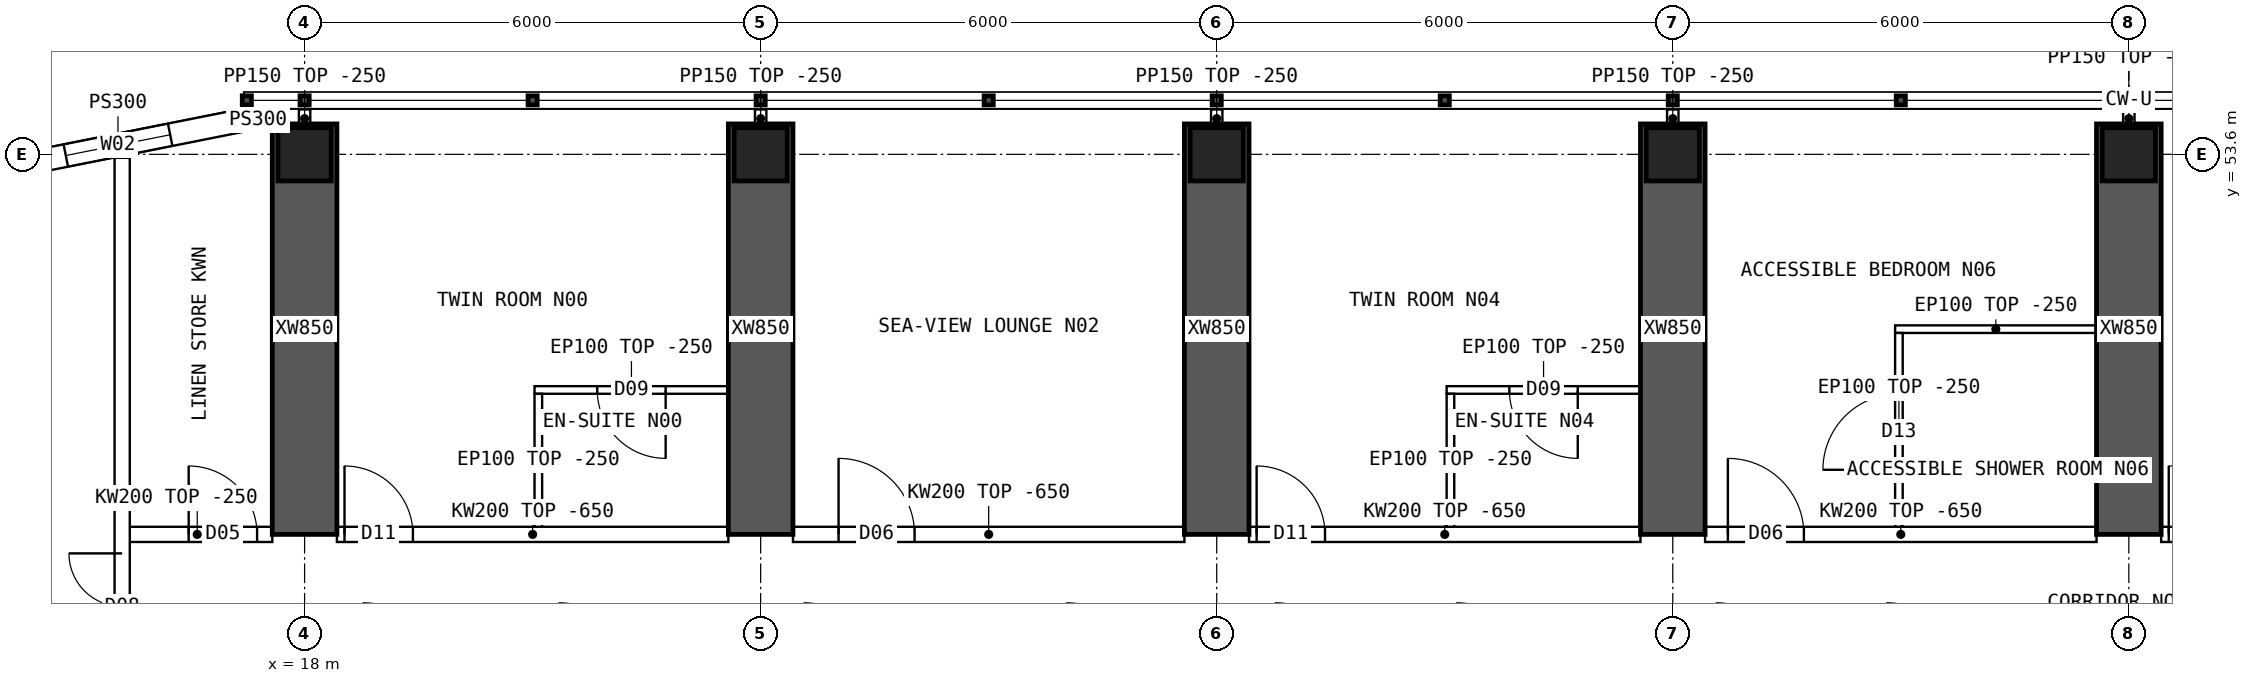
"""IFC4 building model, lengths in metres.
Left out: names, types, materials, properties, quantities, classifications, styles, units other than length and angle.
Written with IfcOpenShell. Run it as: python <this file> out.ifc"""

import sys

from ifc_helpers import new_model, si_unit, direction, frame, frame_2d, origin, origin_2d, place, context, subcontext, project, spatial, polyline, rectangle, hollow_rectangle, outline, extrude, element, fill, save


model = new_model("IFC4")
c1 = context("Model", 3, precision=1e-05, world=origin(), true_north=direction((0.0, 1.0)))
c2 = subcontext(c1, "Body", "Model", "MODEL_VIEW")
j1 = project(units=[si_unit("LENGTHUNIT", "METRE"), si_unit("PLANEANGLEUNIT", "RADIAN")], contexts=[c1])
p1 = place(None, origin())
s1 = spatial("IfcSite", under=j1, at=p1, CompositionType="ELEMENT")
p2 = place(p1, origin())
s2 = spatial("IfcBuilding", under=s1, at=p2, CompositionType="ELEMENT")
p3 = place(p2, frame((0.0, 0.0, 193.6)))
s3 = spatial("IfcBuildingStorey", under=s2, at=p3, CompositionType="ELEMENT", Elevation=193.6)
for number, where, z_axis, x_axis in (
    (1, (18.0, 53.6, 0.0), (0.0, 0.0, 1.0), (1.0, 0.0, 0.0)),
    (2, (24.0, 53.6, 0.0), (0.0, 0.0, 1.0), (1.0, 0.0, 0.0)),
    (3, (30.0, 53.6, 0.0), (0.0, 0.0, 1.0), (1.0, 0.0, 0.0)),
    (4, (36.0, 53.6, 0.0), (0.0, 0.0, 1.0), (1.0, 0.0, 0.0)),
    (5, (42.0, 53.6, 0.0), (0.0, 0.0, 1.0), (1.0, 0.0, 0.0)),
):
    element("IfcColumn", number, at=place(p3, frame(where, z_axis=z_axis, x_axis=x_axis)), inside=s3, PredefinedType="COLUMN", context=c2, shape_type="SweptSolid", body=[
        extrude(hollow_rectangle(XDim=0.7, YDim=0.7, WallThickness=0.07, at=origin_2d()), origin(), (0.0, 0.0, 1.0), 3.75),
    ])
for number, where, z_axis, x_axis in (
    (6, (18.0, 48.6, 0.0), (0.0, 0.0, 1.0), (0.0, 1.0, 0.0)),
    (7, (24.0, 48.6, 0.0), (0.0, 0.0, 1.0), (0.0, 1.0, 0.0)),
    (8, (30.0, 48.6, 0.0), (0.0, 0.0, 1.0), (0.0, 1.0, 0.0)),
    (9, (36.0, 48.6, 0.0), (0.0, 0.0, 1.0), (0.0, 1.0, 0.0)),
    (10, (42.0, 48.6, 0.0), (0.0, 0.0, 1.0), (0.0, 1.0, 0.0)),
):
    element("IfcWall", number, at=place(p3, frame(where, z_axis=z_axis, x_axis=x_axis)), inside=s3, PredefinedType="SHEAR", context=c2, shape_type="SweptSolid", body=[
        extrude(rectangle(XDim=5.4, YDim=0.85, at=frame_2d((2.7, 0.0))), origin(), (0.0, 0.0, 1.0), 3.75),
    ])
p4 = place(p3, frame((17.2, 54.05, 0.0), z_axis=(0.0, 0.0, 1.0), x_axis=(-0.98078325777, -0.195100490205, 0.0)))
e11 = element("IfcWall", 11, at=p4, inside=s3, PredefinedType="SOLIDWALL", context=c2, shape_type="SweptSolid", body=[
    extrude(outline(polyline([(-0.03, -0.15), (3.405, -0.15), (3.345, 0.15), (0.03, 0.15), (-0.03, -0.15)])), origin(), (0.0, 0.0, 1.0), 3.5),
])
p5 = place(p4, frame((0.988, 0.0, 0.9)))
e12 = element("IfcOpeningElement", 12, at=p5, cuts=e11, PredefinedType="OPENING", context=c2, shape_type="SweptSolid", body=[
    extrude(rectangle(XDim=1.4, YDim=1.8, at=frame_2d((0.7, 0.9))), frame((0.0, 0.16, 0.0), z_axis=(0.0, -1.0, 0.0), x_axis=(1.0, 0.0, 0.0)), (0.0, 0.0, 1.0), 0.32),
])
p6 = place(p3, frame((17.2, 54.05, 0.0), z_axis=(0.0, 0.0, 1.0), x_axis=(1.0, 0.0, 0.0)))
e13 = element("IfcWall", 13, at=p6, inside=s3, PredefinedType="SOLIDWALL", context=c2, shape_type="SweptSolid", body=[
    extrude(rectangle(XDim=0.375, YDim=0.3, at=frame_2d((0.188, 0.0))), origin(), (0.0, 0.0, 1.0), 3.5),
])
p7 = place(p3, frame((15.6, 48.6, 0.0), z_axis=(0.0, 0.0, 1.0), x_axis=(1.0, 0.0, 0.0)))
e14 = element("IfcWall", 14, at=p7, inside=s3, PredefinedType="SOLIDWALL", context=c2, shape_type="SweptSolid", body=[
    extrude(rectangle(XDim=1.975, YDim=0.2, at=frame_2d((0.987, 0.0))), origin(), (0.0, 0.0, 1.0), 3.5),
])
p8 = place(p7, frame((0.875, 0.0, 0.0)))
e15 = element("IfcOpeningElement", 15, at=p8, cuts=e14, PredefinedType="OPENING", context=c2, shape_type="SweptSolid", body=[
    extrude(rectangle(XDim=0.9, YDim=2.1, at=frame_2d((0.45, 1.05))), frame((0.0, 0.11, 0.0), z_axis=(0.0, -1.0, 0.0), x_axis=(1.0, 0.0, 0.0)), (0.0, 0.0, 1.0), 0.22),
])
p9 = place(p3, frame((18.425, 48.6, 0.0), z_axis=(0.0, 0.0, 1.0), x_axis=(1.0, 0.0, 0.0)))
e16 = element("IfcWall", 16, at=p9, inside=s3, PredefinedType="SOLIDWALL", context=c2, shape_type="SweptSolid", body=[
    extrude(outline(polyline([(0.0, 0.0), (5.15, 0.0), (5.15, 3.1), (0.0, 3.1), (0.0, 0.0)])), frame((0.0, 0.1, 0.0), z_axis=(0.0, -1.0, 0.0), x_axis=(1.0, 0.0, 0.0)), (0.0, 0.0, 1.0), 0.2),
])
p10 = place(p9, frame((0.1, 0.0, 0.0)))
e17 = element("IfcOpeningElement", 17, at=p10, cuts=e16, PredefinedType="OPENING", context=c2, shape_type="SweptSolid", body=[
    extrude(rectangle(XDim=0.9, YDim=2.1, at=frame_2d((0.45, 1.05))), frame((0.0, 0.11, 0.0), z_axis=(0.0, -1.0, 0.0), x_axis=(1.0, 0.0, 0.0)), (0.0, 0.0, 1.0), 0.22),
])
p11 = place(p3, frame((24.425, 48.6, 0.0), z_axis=(0.0, 0.0, 1.0), x_axis=(1.0, 0.0, 0.0)))
e18 = element("IfcWall", 18, at=p11, inside=s3, PredefinedType="SOLIDWALL", context=c2, shape_type="SweptSolid", body=[
    extrude(outline(polyline([(0.0, 0.0), (5.15, 0.0), (5.15, 3.1), (0.0, 3.1), (0.0, 0.0)])), frame((0.0, 0.1, 0.0), z_axis=(0.0, -1.0, 0.0), x_axis=(1.0, 0.0, 0.0)), (0.0, 0.0, 1.0), 0.2),
])
p12 = place(p11, frame((0.6, 0.0, 0.0)))
e19 = element("IfcOpeningElement", 19, at=p12, cuts=e18, PredefinedType="OPENING", context=c2, shape_type="SweptSolid", body=[
    extrude(rectangle(XDim=1.0, YDim=2.1, at=frame_2d((0.5, 1.05))), frame((0.0, 0.11, 0.0), z_axis=(0.0, -1.0, 0.0), x_axis=(1.0, 0.0, 0.0)), (0.0, 0.0, 1.0), 0.22),
])
p13 = place(p3, frame((30.425, 48.6, 0.0), z_axis=(0.0, 0.0, 1.0), x_axis=(1.0, 0.0, 0.0)))
e20 = element("IfcWall", 20, at=p13, inside=s3, PredefinedType="SOLIDWALL", context=c2, shape_type="SweptSolid", body=[
    extrude(outline(polyline([(0.0, 0.0), (5.15, 0.0), (5.15, 3.1), (0.0, 3.1), (0.0, 0.0)])), frame((0.0, 0.1, 0.0), z_axis=(0.0, -1.0, 0.0), x_axis=(1.0, 0.0, 0.0)), (0.0, 0.0, 1.0), 0.2),
])
p14 = place(p13, frame((0.1, 0.0, 0.0)))
e21 = element("IfcOpeningElement", 21, at=p14, cuts=e20, PredefinedType="OPENING", context=c2, shape_type="SweptSolid", body=[
    extrude(rectangle(XDim=0.9, YDim=2.1, at=frame_2d((0.45, 1.05))), frame((0.0, 0.11, 0.0), z_axis=(0.0, -1.0, 0.0), x_axis=(1.0, 0.0, 0.0)), (0.0, 0.0, 1.0), 0.22),
])
p15 = place(p3, frame((36.425, 48.6, 0.0), z_axis=(0.0, 0.0, 1.0), x_axis=(1.0, 0.0, 0.0)))
e22 = element("IfcWall", 22, at=p15, inside=s3, PredefinedType="SOLIDWALL", context=c2, shape_type="SweptSolid", body=[
    extrude(outline(polyline([(0.0, 0.0), (5.15, 0.0), (5.15, 3.1), (0.0, 3.1), (0.0, 0.0)])), frame((0.0, 0.1, 0.0), z_axis=(0.0, -1.0, 0.0), x_axis=(1.0, 0.0, 0.0)), (0.0, 0.0, 1.0), 0.2),
])
p16 = place(p15, frame((0.3, 0.0, 0.0)))
e23 = element("IfcOpeningElement", 23, at=p16, cuts=e22, PredefinedType="OPENING", context=c2, shape_type="SweptSolid", body=[
    extrude(rectangle(XDim=1.0, YDim=2.1, at=frame_2d((0.5, 1.05))), frame((0.0, 0.11, 0.0), z_axis=(0.0, -1.0, 0.0), x_axis=(1.0, 0.0, 0.0)), (0.0, 0.0, 1.0), 0.22),
])
p17 = place(p3, frame((42.425, 48.6, 0.0), z_axis=(0.0, 0.0, 1.0), x_axis=(1.0, 0.0, 0.0)))
e24 = element("IfcWall", 24, at=p17, inside=s3, PredefinedType="SOLIDWALL", context=c2, shape_type="SweptSolid", body=[
    extrude(outline(polyline([(0.0, 0.0), (5.15, 0.0), (5.15, 3.1), (0.0, 3.1), (0.0, 0.0)])), frame((0.0, 0.1, 0.0), z_axis=(0.0, -1.0, 0.0), x_axis=(1.0, 0.0, 0.0)), (0.0, 0.0, 1.0), 0.2),
])
p18 = place(p17, frame((0.1, 0.0, 0.0)))
e25 = element("IfcOpeningElement", 25, at=p18, cuts=e24, PredefinedType="OPENING", context=c2, shape_type="SweptSolid", body=[
    extrude(rectangle(XDim=0.9, YDim=2.1, at=frame_2d((0.45, 1.05))), frame((0.0, 0.11, 0.0), z_axis=(0.0, -1.0, 0.0), x_axis=(1.0, 0.0, 0.0)), (0.0, 0.0, 1.0), 0.22),
])
p19 = place(p3, frame((21.025, 50.5, 0.0), z_axis=(0.0, 0.0, 1.0), x_axis=(1.0, 0.0, 0.0)))
e26 = element("IfcWall", 26, at=p19, inside=s3, PredefinedType="PARTITIONING", context=c2, shape_type="SweptSolid", body=[
    extrude(rectangle(XDim=2.55, YDim=0.1, at=frame_2d((1.275, 0.0))), origin(), (0.0, 0.0, 1.0), 3.5),
])
p20 = place(p19, frame((0.825, 0.0, 0.0)))
e27 = element("IfcOpeningElement", 27, at=p20, cuts=e26, PredefinedType="OPENING", context=c2, shape_type="SweptSolid", body=[
    extrude(rectangle(XDim=0.9, YDim=2.1, at=frame_2d((0.45, 1.05))), frame((0.0, 0.06, 0.0), z_axis=(0.0, -1.0, 0.0), x_axis=(1.0, 0.0, 0.0)), (0.0, 0.0, 1.0), 0.12),
])
p21 = place(p3, frame((21.075, 50.45, 0.0), z_axis=(0.0, 0.0, 1.0), x_axis=(0.0, -1.0, 0.0)))
e28 = element("IfcWall", 28, at=p21, inside=s3, PredefinedType="PARTITIONING", context=c2, shape_type="SweptSolid", body=[
    extrude(outline(polyline([(0.0, 0.0), (1.75, 0.0), (1.75, 3.1), (1.702, 3.1), (1.7, 3.5), (0.0, 3.5), (0.0, 0.0)])), frame((0.0, 0.05, 0.0), z_axis=(0.0, -1.0, 0.0), x_axis=(1.0, 0.0, 0.0)), (0.0, 0.0, 1.0), 0.1),
])
p22 = place(p3, frame((33.025, 50.5, 0.0), z_axis=(0.0, 0.0, 1.0), x_axis=(1.0, 0.0, 0.0)))
e29 = element("IfcWall", 29, at=p22, inside=s3, PredefinedType="PARTITIONING", context=c2, shape_type="SweptSolid", body=[
    extrude(rectangle(XDim=2.55, YDim=0.1, at=frame_2d((1.275, 0.0))), origin(), (0.0, 0.0, 1.0), 3.5),
])
p23 = place(p22, frame((0.825, 0.0, 0.0)))
e30 = element("IfcOpeningElement", 30, at=p23, cuts=e29, PredefinedType="OPENING", context=c2, shape_type="SweptSolid", body=[
    extrude(rectangle(XDim=0.9, YDim=2.1, at=frame_2d((0.45, 1.05))), frame((0.0, 0.06, 0.0), z_axis=(0.0, -1.0, 0.0), x_axis=(1.0, 0.0, 0.0)), (0.0, 0.0, 1.0), 0.12),
])
p24 = place(p3, frame((33.075, 50.45, 0.0), z_axis=(0.0, 0.0, 1.0), x_axis=(0.0, -1.0, 0.0)))
e31 = element("IfcWall", 31, at=p24, inside=s3, PredefinedType="PARTITIONING", context=c2, shape_type="SweptSolid", body=[
    extrude(outline(polyline([(0.0, 0.0), (1.75, 0.0), (1.75, 3.1), (1.702, 3.1), (1.7, 3.5), (0.0, 3.5), (0.0, 0.0)])), frame((0.0, 0.05, 0.0), z_axis=(0.0, -1.0, 0.0), x_axis=(1.0, 0.0, 0.0)), (0.0, 0.0, 1.0), 0.1),
])
p25 = place(p3, frame((38.925, 51.3, 0.0), z_axis=(0.0, 0.0, 1.0), x_axis=(1.0, 0.0, 0.0)))
e32 = element("IfcWall", 32, at=p25, inside=s3, PredefinedType="PARTITIONING", context=c2, shape_type="SweptSolid", body=[
    extrude(rectangle(XDim=2.65, YDim=0.1, at=frame_2d((1.325, 0.0))), origin(), (0.0, 0.0, 1.0), 3.5),
])
p26 = place(p3, frame((38.975, 51.25, 0.0), z_axis=(0.0, 0.0, 1.0), x_axis=(0.0, -1.0, 0.0)))
e33 = element("IfcWall", 33, at=p26, inside=s3, PredefinedType="PARTITIONING", context=c2, shape_type="SweptSolid", body=[
    extrude(outline(polyline([(0.0, 0.0), (2.55, 0.0), (2.55, 3.1), (2.502, 3.1), (2.5, 3.5), (0.0, 3.5), (0.0, 0.0)])), frame((0.0, 0.05, 0.0), z_axis=(0.0, -1.0, 0.0), x_axis=(1.0, 0.0, 0.0)), (0.0, 0.0, 1.0), 0.1),
])
p27 = place(p26, frame((0.8, 0.0, 0.0)))
e34 = element("IfcOpeningElement", 34, at=p27, cuts=e33, PredefinedType="OPENING", context=c2, shape_type="SweptSolid", body=[
    extrude(rectangle(XDim=1.0, YDim=2.1, at=frame_2d((0.5, 1.05))), frame((0.0, 0.06, 0.0), z_axis=(0.0, -1.0, 0.0), x_axis=(1.0, 0.0, 0.0)), (0.0, 0.0, 1.0), 0.12),
])
p28 = place(p3, frame((15.6, 10.446, 0.0), z_axis=(0.0, 0.0, 1.0), x_axis=(0.0, 1.0, 0.0)))
e35 = element("IfcWall", 35, at=p28, inside=s3, PredefinedType="SOLIDWALL", context=c2, shape_type="SweptSolid", body=[
    extrude(rectangle(XDim=43.107, YDim=0.2, at=frame_2d((21.554, 0.0))), origin(), (0.0, 0.0, 1.0), 3.5),
])
p29 = place(p28, frame((5.104, 0.0, 0.0)))
e36 = element("IfcOpeningElement", 36, at=p29, cuts=e35, PredefinedType="OPENING", context=c2, shape_type="SweptSolid", body=[
    extrude(rectangle(XDim=1.4, YDim=2.1, at=frame_2d((0.7, 1.05))), frame((0.0, 0.11, 0.0), z_axis=(0.0, -1.0, 0.0), x_axis=(1.0, 0.0, 0.0)), (0.0, 0.0, 1.0), 0.22),
])
p30 = place(p28, frame((36.504, 0.0, 0.0)))
e37 = element("IfcOpeningElement", 37, at=p30, cuts=e35, PredefinedType="OPENING", context=c2, shape_type="SweptSolid", body=[
    extrude(rectangle(XDim=1.4, YDim=2.1, at=frame_2d((0.7, 1.05))), frame((0.0, 0.11, 0.0), z_axis=(0.0, -1.0, 0.0), x_axis=(1.0, 0.0, 0.0)), (0.0, 0.0, 1.0), 0.22),
])
for number, where, z_axis, x_axis in (
    (38, (18.0, 53.95, 0.0), (0.0, 0.0, 1.0), (0.0, 1.0, 0.0)),
    (39, (24.0, 53.95, 0.0), (0.0, 0.0, 1.0), (0.0, 1.0, 0.0)),
    (40, (30.0, 53.95, 0.0), (0.0, 0.0, 1.0), (0.0, 1.0, 0.0)),
    (41, (36.0, 53.95, 0.0), (0.0, 0.0, 1.0), (0.0, 1.0, 0.0)),
    (42, (42.0, 53.95, 0.0), (0.0, 0.0, 1.0), (0.0, 1.0, 0.0)),
):
    element("IfcWall", number, at=place(p3, frame(where, z_axis=z_axis, x_axis=x_axis)), inside=s3, PredefinedType="PARTITIONING", context=c2, shape_type="SweptSolid", body=[
        extrude(rectangle(XDim=0.24, YDim=0.15, at=frame_2d((0.12, 0.0))), origin(), (0.0, 0.0, 1.0), 3.5),
    ])
p31 = place(p5, origin())
e43 = element("IfcWindow", 43, at=p31, inside=s3, PartitioningType="SINGLE_PANEL", PredefinedType="WINDOW", context=c2, shape_type="SweptSolid", body=[
    extrude(rectangle(XDim=1.4, YDim=1.8, at=frame_2d((0.7, 0.9))), frame((0.0, 0.03, 0.0), z_axis=(0.0, -1.0, 0.0), x_axis=(1.0, 0.0, 0.0)), (0.0, 0.0, 1.0), 0.06),
])
fill(e12, e43)
p32 = place(p20, origin())
e44 = element("IfcDoor", 44, at=p32, inside=s3, OperationType="SINGLE_SWING_RIGHT", PredefinedType="DOOR", context=c2, shape_type="SweptSolid", body=[
    extrude(rectangle(XDim=0.9, YDim=2.1, at=frame_2d((0.45, 1.05))), frame((0.0, 0.025, 0.0), z_axis=(0.0, -1.0, 0.0), x_axis=(1.0, 0.0, 0.0)), (0.0, 0.0, 1.0), 0.05),
])
fill(e27, e44)
p33 = place(p10, origin())
e45 = element("IfcDoor", 45, at=p33, inside=s3, OperationType="SINGLE_SWING_LEFT", PredefinedType="DOOR", context=c2, shape_type="SweptSolid", body=[
    extrude(rectangle(XDim=0.9, YDim=2.1, at=frame_2d((0.45, 1.05))), frame((0.0, 0.025, 0.0), z_axis=(0.0, -1.0, 0.0), x_axis=(1.0, 0.0, 0.0)), (0.0, 0.0, 1.0), 0.05),
])
fill(e17, e45)
p34 = place(p12, origin())
e46 = element("IfcDoor", 46, at=p34, inside=s3, OperationType="SINGLE_SWING_LEFT", PredefinedType="DOOR", context=c2, shape_type="SweptSolid", body=[
    extrude(rectangle(XDim=1.0, YDim=2.1, at=frame_2d((0.5, 1.05))), frame((0.0, 0.025, 0.0), z_axis=(0.0, -1.0, 0.0), x_axis=(1.0, 0.0, 0.0)), (0.0, 0.0, 1.0), 0.05),
])
fill(e19, e46)
p35 = place(p23, origin())
e47 = element("IfcDoor", 47, at=p35, inside=s3, OperationType="SINGLE_SWING_RIGHT", PredefinedType="DOOR", context=c2, shape_type="SweptSolid", body=[
    extrude(rectangle(XDim=0.9, YDim=2.1, at=frame_2d((0.45, 1.05))), frame((0.0, 0.025, 0.0), z_axis=(0.0, -1.0, 0.0), x_axis=(1.0, 0.0, 0.0)), (0.0, 0.0, 1.0), 0.05),
])
fill(e30, e47)
p36 = place(p14, origin())
e48 = element("IfcDoor", 48, at=p36, inside=s3, OperationType="SINGLE_SWING_LEFT", PredefinedType="DOOR", context=c2, shape_type="SweptSolid", body=[
    extrude(rectangle(XDim=0.9, YDim=2.1, at=frame_2d((0.45, 1.05))), frame((0.0, 0.025, 0.0), z_axis=(0.0, -1.0, 0.0), x_axis=(1.0, 0.0, 0.0)), (0.0, 0.0, 1.0), 0.05),
])
fill(e21, e48)
p37 = place(p27, origin())
e49 = element("IfcDoor", 49, at=p37, inside=s3, OperationType="SINGLE_SWING_RIGHT", PredefinedType="DOOR", context=c2, shape_type="SweptSolid", body=[
    extrude(rectangle(XDim=1.0, YDim=2.1, at=frame_2d((0.5, 1.05))), frame((0.0, 0.025, 0.0), z_axis=(0.0, -1.0, 0.0), x_axis=(1.0, 0.0, 0.0)), (0.0, 0.0, 1.0), 0.05),
])
fill(e34, e49)
p38 = place(p16, origin())
e50 = element("IfcDoor", 50, at=p38, inside=s3, OperationType="SINGLE_SWING_LEFT", PredefinedType="DOOR", context=c2, shape_type="SweptSolid", body=[
    extrude(rectangle(XDim=1.0, YDim=2.1, at=frame_2d((0.5, 1.05))), frame((0.0, 0.025, 0.0), z_axis=(0.0, -1.0, 0.0), x_axis=(1.0, 0.0, 0.0)), (0.0, 0.0, 1.0), 0.05),
])
fill(e23, e50)
p39 = place(p18, origin())
e51 = element("IfcDoor", 51, at=p39, inside=s3, OperationType="SINGLE_SWING_LEFT", PredefinedType="DOOR", context=c2, shape_type="SweptSolid", body=[
    extrude(rectangle(XDim=0.9, YDim=2.1, at=frame_2d((0.45, 1.05))), frame((0.0, 0.025, 0.0), z_axis=(0.0, -1.0, 0.0), x_axis=(1.0, 0.0, 0.0)), (0.0, 0.0, 1.0), 0.05),
])
fill(e25, e51)
p40 = place(p30, origin())
e52 = element("IfcDoor", 52, at=p40, inside=s3, OperationType="DOUBLE_DOOR_SINGLE_SWING", PredefinedType="DOOR", context=c2, shape_type="SweptSolid", body=[
    extrude(rectangle(XDim=1.4, YDim=2.1, at=frame_2d((0.7, 1.05))), frame((0.0, 0.025, 0.0), z_axis=(0.0, -1.0, 0.0), x_axis=(1.0, 0.0, 0.0)), (0.0, 0.0, 1.0), 0.05),
])
fill(e37, e52)
p41 = place(p8, origin())
e53 = element("IfcDoor", 53, at=p41, inside=s3, OperationType="SINGLE_SWING_LEFT", PredefinedType="DOOR", context=c2, shape_type="SweptSolid", body=[
    extrude(rectangle(XDim=0.9, YDim=2.1, at=frame_2d((0.45, 1.05))), frame((0.0, 0.025, 0.0), z_axis=(0.0, -1.0, 0.0), x_axis=(1.0, 0.0, 0.0)), (0.0, 0.0, 1.0), 0.05),
])
fill(e15, e53)
save(model, sys.argv[1])
